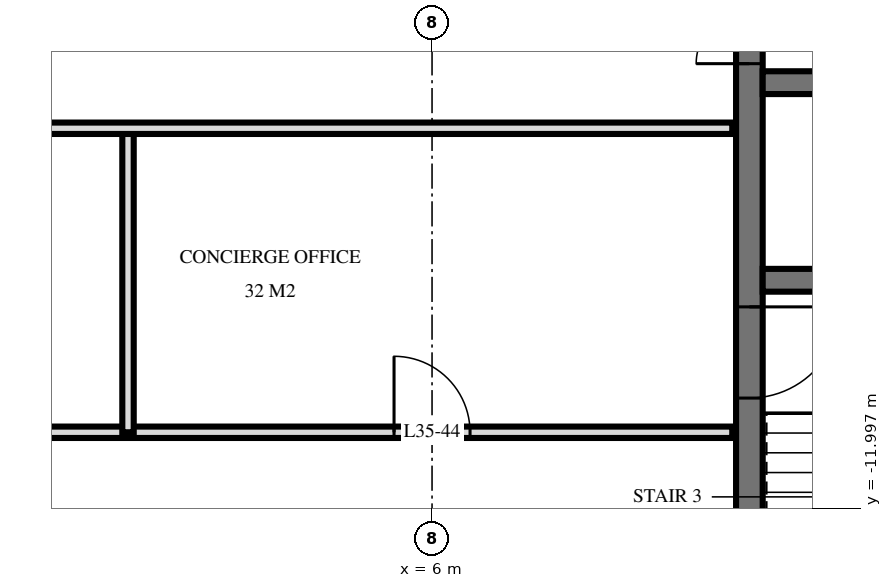
"""IFC4 building model, lengths in metres.
Left out: names, types, materials, properties, quantities, classifications, styles, units other than length and angle.
Written with IfcOpenShell. Run it as: python <this file> out.ifc"""

import sys

from ifc_helpers import new_model, si_unit, direction, frame, frame_2d, origin, place, context, subcontext, project, spatial, rectangle, extrude, element, fill, save


model = new_model("IFC4")
c1 = context("Model", 3, precision=1e-05, world=origin(), true_north=direction((0.0, 1.0)))
c2 = subcontext(c1, "Body", "Model", "MODEL_VIEW")
j1 = project(units=[si_unit("LENGTHUNIT", "METRE"), si_unit("PLANEANGLEUNIT", "RADIAN")], contexts=[c1])
p1 = place(None, origin())
s1 = spatial("IfcSite", under=j1, at=p1, CompositionType="ELEMENT")
p2 = place(p1, origin())
s2 = spatial("IfcBuilding", under=s1, at=p2, CompositionType="ELEMENT")
p3 = place(p2, frame((0.0, 0.0, 138.0)))
s3 = spatial("IfcBuildingStorey", under=s2, at=p3, CompositionType="ELEMENT", Elevation=138.0)
p4 = place(p3, frame((10.175, -14.55, 0.0), z_axis=(0.0, 0.0, 1.0), x_axis=(0.0, 1.0, 0.0)))
e1 = element("IfcWall", 1, at=p4, inside=s3, PredefinedType="SHEAR", context=c2, shape_type="SweptSolid", body=[
    extrude(rectangle(XDim=14.1, YDim=0.35, at=frame_2d((7.05, 0.0))), origin(), (0.0, 0.0, 1.0), 3.6),
])
p5 = place(p4, frame((8.4, 0.0, 0.0)))
e2 = element("IfcOpeningElement", 2, at=p5, cuts=e1, PredefinedType="OPENING", context=c2, shape_type="SweptSolid", body=[
    extrude(rectangle(XDim=1.4, YDim=2.4, at=frame_2d((0.7, 1.2))), frame((0.0, 0.185, 0.0), z_axis=(0.0, -1.0, 0.0), x_axis=(1.0, 0.0, 0.0)), (0.0, 0.0, 1.0), 0.37),
])
p6 = place(p4, frame((10.0, 0.0, 0.0)))
e3 = element("IfcOpeningElement", 3, at=p6, cuts=e1, PredefinedType="OPENING", context=c2, shape_type="SweptSolid", body=[
    extrude(rectangle(XDim=1.4, YDim=2.4, at=frame_2d((0.7, 1.2))), frame((0.0, 0.185, 0.0), z_axis=(0.0, -1.0, 0.0), x_axis=(1.0, 0.0, 0.0)), (0.0, 0.0, 1.0), 0.37),
])
p7 = place(p4, frame((4.0, 0.0, 0.0)))
e4 = element("IfcOpeningElement", 4, at=p7, cuts=e1, PredefinedType="OPENING", context=c2, shape_type="SweptSolid", body=[
    extrude(rectangle(XDim=1.2, YDim=2.1, at=frame_2d((0.6, 1.05))), frame((0.0, 0.185, 0.0), z_axis=(0.0, -1.0, 0.0), x_axis=(1.0, 0.0, 0.0)), (0.0, 0.0, 1.0), 0.37),
])
p8 = place(p3, frame((10.35, -6.4, 0.0), z_axis=(0.0, 0.0, 1.0), x_axis=(1.0, 0.0, 0.0)))
e5 = element("IfcWall", 5, at=p8, inside=s3, PredefinedType="SHEAR", context=c2, shape_type="SweptSolid", body=[
    extrude(rectangle(XDim=13.7, YDim=0.3, at=frame_2d((6.85, 0.0))), origin(), (0.0, 0.0, 1.0), 3.6),
])
p9 = place(p8, frame((12.05, 0.0, 0.0)))
e6 = element("IfcOpeningElement", 6, at=p9, cuts=e5, PredefinedType="OPENING", context=c2, shape_type="SweptSolid", body=[
    extrude(rectangle(XDim=1.1, YDim=2.1, at=frame_2d((0.55, 1.05))), frame((0.0, 0.16, 0.0), z_axis=(0.0, -1.0, 0.0), x_axis=(1.0, 0.0, 0.0)), (0.0, 0.0, 1.0), 0.32),
])
p10 = place(p8, frame((6.8, 0.0, 0.0)))
e7 = element("IfcOpeningElement", 7, at=p10, cuts=e5, PredefinedType="OPENING", context=c2, shape_type="SweptSolid", body=[
    extrude(rectangle(XDim=1.1, YDim=2.1, at=frame_2d((0.55, 1.05))), frame((0.0, 0.16, 0.0), z_axis=(0.0, -1.0, 0.0), x_axis=(1.0, 0.0, 0.0)), (0.0, 0.0, 1.0), 0.32),
])
p11 = place(p3, frame((10.35, -9.0, 0.0), z_axis=(0.0, 0.0, 1.0), x_axis=(1.0, 0.0, 0.0)))
e8 = element("IfcWall", 8, at=p11, inside=s3, PredefinedType="SHEAR", context=c2, shape_type="SweptSolid", body=[
    extrude(rectangle(XDim=13.7, YDim=0.3, at=frame_2d((6.85, 0.0))), origin(), (0.0, 0.0, 1.0), 3.6),
])
p12 = place(p11, frame((3.8, 0.0, 0.0)))
e9 = element("IfcOpeningElement", 9, at=p12, cuts=e8, PredefinedType="OPENING", context=c2, shape_type="SweptSolid", body=[
    extrude(rectangle(XDim=1.1, YDim=2.1, at=frame_2d((0.55, 1.05))), frame((0.0, 0.16, 0.0), z_axis=(0.0, -1.0, 0.0), x_axis=(1.0, 0.0, 0.0)), (0.0, 0.0, 1.0), 0.32),
])
p13 = place(p3, frame((2.0, -11.0, 0.0), z_axis=(0.0, 0.0, 1.0), x_axis=(0.0, 1.0, 0.0)))
e10 = element("IfcWall", 10, at=p13, inside=s3, PredefinedType="PARTITIONING", context=c2, shape_type="SweptSolid", body=[
    extrude(rectangle(XDim=4.0, YDim=0.15, at=frame_2d((2.0, 0.0))), origin(), (0.0, 0.0, 1.0), 3.32),
])
p14 = place(p3, frame((-9.95, -11.0, 0.0), z_axis=(0.0, 0.0, 1.0), x_axis=(1.0, 0.0, 0.0)))
e11 = element("IfcWall", 11, at=p14, inside=s3, PredefinedType="PARTITIONING", context=c2, shape_type="SweptSolid", body=[
    extrude(rectangle(XDim=19.9, YDim=0.15, at=frame_2d((9.95, 0.0))), origin(), (0.0, 0.0, 1.0), 3.32),
])
p15 = place(p14, frame((9.45, 0.0, 0.0)))
e12 = element("IfcOpeningElement", 12, at=p15, cuts=e11, PredefinedType="OPENING", context=c2, shape_type="SweptSolid", body=[
    extrude(rectangle(XDim=1.0, YDim=2.1, at=frame_2d((0.5, 1.05))), frame((0.0, 0.085, 0.0), z_axis=(0.0, -1.0, 0.0), x_axis=(1.0, 0.0, 0.0)), (0.0, 0.0, 1.0), 0.17),
])
p16 = place(p14, frame((15.45, 0.0, 0.0)))
e13 = element("IfcOpeningElement", 13, at=p16, cuts=e11, PredefinedType="OPENING", context=c2, shape_type="SweptSolid", body=[
    extrude(rectangle(XDim=1.0, YDim=2.1, at=frame_2d((0.5, 1.05))), frame((0.0, 0.085, 0.0), z_axis=(0.0, -1.0, 0.0), x_axis=(1.0, 0.0, 0.0)), (0.0, 0.0, 1.0), 0.17),
])
p17 = place(p3, frame((-9.95, -7.0, 0.0), z_axis=(0.0, 0.0, 1.0), x_axis=(1.0, 0.0, 0.0)))
e14 = element("IfcWall", 14, at=p17, inside=s3, PredefinedType="PARTITIONING", context=c2, shape_type="SweptSolid", body=[
    extrude(rectangle(XDim=19.9, YDim=0.15, at=frame_2d((9.95, 0.0))), origin(), (0.0, 0.0, 1.0), 3.32),
])
p18 = place(p17, frame((9.45, 0.0, 0.0)))
e15 = element("IfcOpeningElement", 15, at=p18, cuts=e14, PredefinedType="OPENING", context=c2, shape_type="SweptSolid", body=[
    extrude(rectangle(XDim=1.0, YDim=2.1, at=frame_2d((0.5, 1.05))), frame((0.0, 0.085, 0.0), z_axis=(0.0, -1.0, 0.0), x_axis=(1.0, 0.0, 0.0)), (0.0, 0.0, 1.0), 0.17),
])
p19 = place(p17, frame((3.45, 0.0, 0.0)))
e16 = element("IfcOpeningElement", 16, at=p19, cuts=e14, PredefinedType="OPENING", context=c2, shape_type="SweptSolid", body=[
    extrude(rectangle(XDim=1.0, YDim=2.1, at=frame_2d((0.5, 1.05))), frame((0.0, 0.085, 0.0), z_axis=(0.0, -1.0, 0.0), x_axis=(1.0, 0.0, 0.0)), (0.0, 0.0, 1.0), 0.17),
])
p20 = place(p5, origin())
e17 = element("IfcDoor", 17, at=p20, inside=s3, OperationType="DOUBLE_DOOR_SINGLE_SWING", PredefinedType="DOOR", context=c2, shape_type="SweptSolid", body=[
    extrude(rectangle(XDim=1.4, YDim=2.4, at=frame_2d((0.7, 1.2))), frame((0.0, 0.025, 0.0), z_axis=(0.0, -1.0, 0.0), x_axis=(1.0, 0.0, 0.0)), (0.0, 0.0, 1.0), 0.05),
])
fill(e2, e17)
p21 = place(p7, frame((0.6, 0.0, 0.0), z_axis=(0.0, 0.0, 1.0), x_axis=(-1.0, 0.0, 0.0)))
e18 = element("IfcDoor", 18, at=p21, inside=s3, OperationType="SINGLE_SWING_RIGHT", PredefinedType="DOOR", context=c2, shape_type="SweptSolid", body=[
    extrude(rectangle(XDim=1.2, YDim=2.1, at=frame_2d((0.0, 1.05))), frame((0.0, -0.025, 0.0), z_axis=(0.0, 1.0, 0.0), x_axis=(-1.0, 0.0, 0.0)), (0.0, 0.0, 1.0), 0.05),
])
fill(e4, e18)
p22 = place(p16, origin())
e19 = element("IfcDoor", 19, at=p22, inside=s3, OperationType="SINGLE_SWING_RIGHT", PredefinedType="DOOR", context=c2, shape_type="SweptSolid", body=[
    extrude(rectangle(XDim=1.0, YDim=2.1, at=frame_2d((0.5, 1.05))), frame((0.0, 0.025, 0.0), z_axis=(0.0, -1.0, 0.0), x_axis=(1.0, 0.0, 0.0)), (0.0, 0.0, 1.0), 0.05),
])
fill(e13, e19)
save(model, sys.argv[1])
